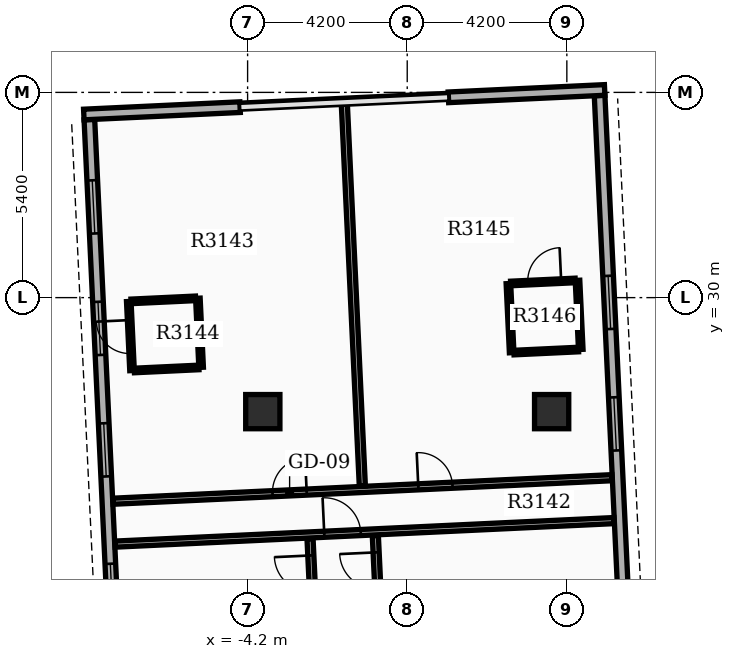
"""IFC4 building model, lengths in metres.
Left out: names, types, materials, properties, quantities, classifications, styles, units other than length and angle.
Written with IfcOpenShell. Run it as: python <this file> out.ifc"""

import sys

from ifc_helpers import new_model, si_unit, direction, frame, frame_2d, origin, origin_2d, place, context, subcontext, project, spatial, rectangle, extrude, element, fill, save


model = new_model("IFC4")
c1 = context("Model", 3, precision=1e-05, world=origin(), true_north=direction((0.0, 1.0)))
c2 = subcontext(c1, "Body", "Model", "MODEL_VIEW")
j1 = project(units=[si_unit("LENGTHUNIT", "METRE"), si_unit("PLANEANGLEUNIT", "RADIAN")], contexts=[c1])
p1 = place(None, origin())
s1 = spatial("IfcSite", under=j1, at=p1, CompositionType="ELEMENT")
p2 = place(p1, origin())
s2 = spatial("IfcBuilding", under=s1, at=p2, CompositionType="ELEMENT")
p3 = place(p2, frame((0.0, 0.0, 196.8)))
s3 = spatial("IfcBuildingStorey", under=s2, at=p3, CompositionType="ELEMENT", Elevation=196.8)
for number, where, z_axis, x_axis in (
    (1, (-3.8, 27.0, 0.0), (0.0, 0.0, 1.0), (1.0, 0.0, 0.0)),
    (2, (3.8, 27.0, 0.0), (0.0, 0.0, 1.0), (1.0, 0.0, 0.0)),
):
    element("IfcColumn", number, at=place(p3, frame(where, z_axis=z_axis, x_axis=x_axis)), inside=s3, PredefinedType="COLUMN", context=c2, shape_type="SweptSolid", body=[
        extrude(rectangle(XDim=0.9, YDim=0.9, at=origin_2d()), origin(), (0.0, 0.0, 1.0), 4.5),
    ])
p4 = place(p3, frame((6.009, 15.24, 0.0), z_axis=(0.0, 0.0, 1.0), x_axis=(-0.047103473814, 0.998890015344, 0.0)))
e3 = element("IfcWall", 3, at=p4, inside=s3, PredefinedType="STANDARD", context=c2, shape_type="SweptSolid", body=[
    extrude(rectangle(XDim=20.1, YDim=0.28, at=frame_2d((10.05, 0.0))), origin(), (0.0, 0.0, 1.0), 3.38),
])
p5 = place(p4, frame((1.6, 0.0, 0.8)))
e4 = element("IfcOpeningElement", 4, at=p5, cuts=e3, PredefinedType="OPENING", context=c2, shape_type="SweptSolid", body=[
    extrude(rectangle(XDim=1.4, YDim=1.6, at=frame_2d((0.7, 0.8))), frame((0.0, 0.15, 0.0), z_axis=(0.0, -1.0, 0.0), x_axis=(1.0, 0.0, 0.0)), (0.0, 0.0, 1.0), 0.3),
])
p6 = place(p4, frame((4.8, 0.0, 0.8)))
e5 = element("IfcOpeningElement", 5, at=p6, cuts=e3, PredefinedType="OPENING", context=c2, shape_type="SweptSolid", body=[
    extrude(rectangle(XDim=1.4, YDim=1.6, at=frame_2d((0.7, 0.8))), frame((0.0, 0.15, 0.0), z_axis=(0.0, -1.0, 0.0), x_axis=(1.0, 0.0, 0.0)), (0.0, 0.0, 1.0), 0.3),
])
p7 = place(p4, frame((10.75, 0.0, 0.8)))
e6 = element("IfcOpeningElement", 6, at=p7, cuts=e3, PredefinedType="OPENING", context=c2, shape_type="SweptSolid", body=[
    extrude(rectangle(XDim=1.4, YDim=1.6, at=frame_2d((0.7, 0.8))), frame((0.0, 0.15, 0.0), z_axis=(0.0, -1.0, 0.0), x_axis=(1.0, 0.0, 0.0)), (0.0, 0.0, 1.0), 0.3),
])
p8 = place(p4, frame((13.95, 0.0, 0.8)))
e7 = element("IfcOpeningElement", 7, at=p8, cuts=e3, PredefinedType="OPENING", context=c2, shape_type="SweptSolid", body=[
    extrude(rectangle(XDim=1.4, YDim=1.6, at=frame_2d((0.7, 0.8))), frame((0.0, 0.15, 0.0), z_axis=(0.0, -1.0, 0.0), x_axis=(1.0, 0.0, 0.0)), (0.0, 0.0, 1.0), 0.3),
])
p9 = place(p3, frame((-8.363, 34.685, 0.0), z_axis=(0.0, 0.0, 1.0), x_axis=(0.047103473814, -0.998890015344, 0.0)))
e8 = element("IfcWall", 8, at=p9, inside=s3, PredefinedType="STANDARD", context=c2, shape_type="SweptSolid", body=[
    extrude(rectangle(XDim=20.1, YDim=0.28, at=frame_2d((10.05, 0.0))), origin(), (0.0, 0.0, 1.0), 3.38),
])
p10 = place(p9, frame((1.6, 0.0, 0.8)))
e9 = element("IfcOpeningElement", 9, at=p10, cuts=e8, PredefinedType="OPENING", context=c2, shape_type="SweptSolid", body=[
    extrude(rectangle(XDim=1.4, YDim=1.6, at=frame_2d((0.7, 0.8))), frame((0.0, 0.15, 0.0), z_axis=(0.0, -1.0, 0.0), x_axis=(1.0, 0.0, 0.0)), (0.0, 0.0, 1.0), 0.3),
])
p11 = place(p9, frame((4.8, 0.0, 0.8)))
e10 = element("IfcOpeningElement", 10, at=p11, cuts=e8, PredefinedType="OPENING", context=c2, shape_type="SweptSolid", body=[
    extrude(rectangle(XDim=1.4, YDim=1.6, at=frame_2d((0.7, 0.8))), frame((0.0, 0.15, 0.0), z_axis=(0.0, -1.0, 0.0), x_axis=(1.0, 0.0, 0.0)), (0.0, 0.0, 1.0), 0.3),
])
p12 = place(p9, frame((8.0, 0.0, 0.8)))
e11 = element("IfcOpeningElement", 11, at=p12, cuts=e8, PredefinedType="OPENING", context=c2, shape_type="SweptSolid", body=[
    extrude(rectangle(XDim=1.4, YDim=1.6, at=frame_2d((0.7, 0.8))), frame((0.0, 0.15, 0.0), z_axis=(0.0, -1.0, 0.0), x_axis=(1.0, 0.0, 0.0)), (0.0, 0.0, 1.0), 0.3),
])
p13 = place(p9, frame((11.7, 0.0, 0.8)))
e12 = element("IfcOpeningElement", 12, at=p13, cuts=e8, PredefinedType="OPENING", context=c2, shape_type="SweptSolid", body=[
    extrude(rectangle(XDim=1.4, YDim=1.6, at=frame_2d((0.7, 0.8))), frame((0.0, 0.15, 0.0), z_axis=(0.0, -1.0, 0.0), x_axis=(1.0, 0.0, 0.0)), (0.0, 0.0, 1.0), 0.3),
])
p14 = place(p9, frame((15.0, 0.0, 0.0)))
e13 = element("IfcOpeningElement", 13, at=p14, cuts=e8, PredefinedType="OPENING", context=c2, shape_type="SweptSolid", body=[
    extrude(rectangle(XDim=0.96, YDim=2.1, at=frame_2d((0.48, 1.05))), frame((0.0, 0.15, 0.0), z_axis=(0.0, -1.0, 0.0), x_axis=(1.0, 0.0, 0.0)), (0.0, 0.0, 1.0), 0.3),
])
p15 = place(p3, frame((5.195, 35.464, 0.0), z_axis=(0.0, 0.0, 1.0), x_axis=(-0.998890436981, -0.047094531617, 0.0)))
e14 = element("IfcWall", 14, at=p15, inside=s3, PredefinedType="STANDARD", context=c2, shape_type="SweptSolid", body=[
    extrude(rectangle(XDim=4.116, YDim=0.28, at=frame_2d((2.058, 0.0))), origin(), (0.0, 0.0, 1.0), 3.38),
])
p16 = place(p3, frame((-4.398, 35.012, 0.0), z_axis=(0.0, 0.0, 1.0), x_axis=(-0.998890305419, -0.047097322001, 0.0)))
e15 = element("IfcWall", 15, at=p16, inside=s3, PredefinedType="STANDARD", context=c2, shape_type="SweptSolid", body=[
    extrude(rectangle(XDim=4.116, YDim=0.28, at=frame_2d((2.058, 0.0))), origin(), (0.0, 0.0, 1.0), 3.38),
])
p17 = place(p3, frame((-0.42, 14.847, 0.0), z_axis=(0.0, 0.0, 1.0), x_axis=(-0.047099864025, 0.99889018556, 0.0)))
e16 = element("IfcWall", 16, at=p17, inside=s3, PredefinedType="PARTITIONING", context=c2, shape_type="SweptSolid", body=[
    extrude(rectangle(XDim=8.9, YDim=0.16, at=frame_2d((4.45, 0.0))), origin(), (0.0, 0.0, 1.0), 3.37),
])
p18 = place(p17, frame((7.5, 0.0, 0.0)))
e17 = element("IfcOpeningElement", 17, at=p18, cuts=e16, PredefinedType="OPENING", context=c2, shape_type="SweptSolid", body=[
    extrude(rectangle(XDim=0.96, YDim=2.15, at=frame_2d((0.48, 1.075))), frame((0.0, 0.09, 0.0), z_axis=(0.0, -1.0, 0.0), x_axis=(1.0, 0.0, 0.0)), (0.0, 0.0, 1.0), 0.18),
])
p19 = place(p3, frame((-2.138, 14.766, 0.0), z_axis=(0.0, 0.0, 1.0), x_axis=(-0.047099864025, 0.99889018556, 0.0)))
e18 = element("IfcWall", 18, at=p19, inside=s3, PredefinedType="PARTITIONING", context=c2, shape_type="SweptSolid", body=[
    extrude(rectangle(XDim=8.9, YDim=0.16, at=frame_2d((4.45, 0.0))), origin(), (0.0, 0.0, 1.0), 3.37),
])
p20 = place(p19, frame((7.5, 0.0, 0.0)))
e19 = element("IfcOpeningElement", 19, at=p20, cuts=e18, PredefinedType="OPENING", context=c2, shape_type="SweptSolid", body=[
    extrude(rectangle(XDim=0.96, YDim=2.15, at=frame_2d((0.48, 1.075))), frame((0.0, 0.09, 0.0), z_axis=(0.0, -1.0, 0.0), x_axis=(1.0, 0.0, 0.0)), (0.0, 0.0, 1.0), 0.18),
])
p21 = place(p3, frame((-7.688, 23.514, 0.0), z_axis=(0.0, 0.0, 1.0), x_axis=(0.998889093558, 0.047123017412, 0.0)))
e20 = element("IfcWall", 20, at=p21, inside=s3, PredefinedType="PARTITIONING", context=c2, shape_type="SweptSolid", body=[
    extrude(rectangle(XDim=13.144, YDim=0.16, at=frame_2d((6.572, 0.0))), origin(), (0.0, 0.0, 1.0), 3.37),
])
p22 = place(p21, frame((5.512, 0.0, 0.0)))
e21 = element("IfcOpeningElement", 21, at=p22, cuts=e20, PredefinedType="OPENING", context=c2, shape_type="SweptSolid", body=[
    extrude(rectangle(XDim=0.96, YDim=2.15, at=frame_2d((0.48, 1.075))), frame((0.0, 0.09, 0.0), z_axis=(0.0, -1.0, 0.0), x_axis=(1.0, 0.0, 0.0)), (0.0, 0.0, 1.0), 0.18),
])
p23 = place(p3, frame((-7.741, 24.643, 0.0), z_axis=(0.0, 0.0, 1.0), x_axis=(0.998889093558, 0.047123017412, 0.0)))
e22 = element("IfcWall", 22, at=p23, inside=s3, PredefinedType="PARTITIONING", context=c2, shape_type="SweptSolid", body=[
    extrude(rectangle(XDim=13.144, YDim=0.16, at=frame_2d((6.572, 0.0))), origin(), (0.0, 0.0, 1.0), 3.37),
])
p24 = place(p23, frame((4.202, 0.0, 0.0)))
e23 = element("IfcOpeningElement", 23, at=p24, cuts=e22, PredefinedType="OPENING", context=c2, shape_type="SweptSolid", body=[
    extrude(rectangle(XDim=0.9, YDim=2.15, at=frame_2d((0.45, 1.075))), frame((0.0, 0.09, 0.0), z_axis=(0.0, -1.0, 0.0), x_axis=(1.0, 0.0, 0.0)), (0.0, 0.0, 1.0), 0.18),
])
p25 = place(p23, frame((8.042, 0.0, 0.0)))
e24 = element("IfcOpeningElement", 24, at=p25, cuts=e22, PredefinedType="OPENING", context=c2, shape_type="SweptSolid", body=[
    extrude(rectangle(XDim=0.9, YDim=2.15, at=frame_2d((0.45, 1.075))), frame((0.0, 0.09, 0.0), z_axis=(0.0, -1.0, 0.0), x_axis=(1.0, 0.0, 0.0)), (0.0, 0.0, 1.0), 0.18),
])
p26 = place(p3, frame((-1.181, 25.042, 0.0), z_axis=(0.0, 0.0, 1.0), x_axis=(-0.047120592333, 0.99888920796, 0.0)))
e25 = element("IfcWall", 25, at=p26, inside=s3, PredefinedType="PARTITIONING", context=c2, shape_type="SweptSolid", body=[
    extrude(rectangle(XDim=10.15, YDim=0.16, at=frame_2d((5.075, 0.0))), origin(), (0.0, 0.0, 1.0), 3.37),
])
p27 = place(p3, frame((-7.241, 28.08, 0.0), z_axis=(0.0, 0.0, 1.0), x_axis=(-0.047080807099, 0.998891083954, 0.0)))
e26 = element("IfcWall", 26, at=p27, inside=s3, PredefinedType="PARTITIONING", context=c2, shape_type="SweptSolid", body=[
    extrude(rectangle(XDim=1.82, YDim=0.12, at=frame_2d((0.91, 0.0))), origin(), (0.0, 0.0, 1.0), 3.37),
])
p28 = place(p27, frame((0.45, 0.0, 0.0)))
e27 = element("IfcOpeningElement", 27, at=p28, cuts=e26, PredefinedType="OPENING", context=c2, shape_type="SweptSolid", body=[
    extrude(rectangle(XDim=0.88, YDim=2.1, at=frame_2d((0.44, 1.05))), frame((0.0, 0.07, 0.0), z_axis=(0.0, -1.0, 0.0), x_axis=(1.0, 0.0, 0.0)), (0.0, 0.0, 1.0), 0.14),
])
p29 = place(p3, frame((-5.423, 28.166, 0.0), z_axis=(0.0, 0.0, 1.0), x_axis=(-0.047080807099, 0.998891083954, 0.0)))
e28 = element("IfcWall", 28, at=p29, inside=s3, PredefinedType="PARTITIONING", context=c2, shape_type="SweptSolid", body=[
    extrude(rectangle(XDim=1.82, YDim=0.12, at=frame_2d((0.91, 0.0))), origin(), (0.0, 0.0, 1.0), 3.37),
])
p30 = place(p3, frame((-7.181, 28.083, 0.0), z_axis=(0.0, 0.0, 1.0), x_axis=(0.998890122477, 0.047101201865, 0.0)))
e29 = element("IfcWall", 29, at=p30, inside=s3, PredefinedType="PARTITIONING", context=c2, shape_type="SweptSolid", body=[
    extrude(rectangle(XDim=1.7, YDim=0.12, at=frame_2d((0.85, 0.0))), origin(), (0.0, 0.0, 1.0), 3.37),
])
p31 = place(p3, frame((-7.267, 29.901, 0.0), z_axis=(0.0, 0.0, 1.0), x_axis=(0.998889803826, 0.047107959116, 0.0)))
e30 = element("IfcWall", 30, at=p31, inside=s3, PredefinedType="PARTITIONING", context=c2, shape_type="SweptSolid", body=[
    extrude(rectangle(XDim=1.7, YDim=0.12, at=frame_2d((0.85, 0.0))), origin(), (0.0, 0.0, 1.0), 3.37),
])
p32 = place(p3, frame((2.748, 28.551, 0.0), z_axis=(0.0, 0.0, 1.0), x_axis=(-0.047080807099, 0.998891083954, 0.0)))
e31 = element("IfcWall", 31, at=p32, inside=s3, PredefinedType="PARTITIONING", context=c2, shape_type="SweptSolid", body=[
    extrude(rectangle(XDim=1.82, YDim=0.12, at=frame_2d((0.91, 0.0))), origin(), (0.0, 0.0, 1.0), 3.37),
])
p33 = place(p3, frame((4.566, 28.637, 0.0), z_axis=(0.0, 0.0, 1.0), x_axis=(-0.047087116047, 0.998890786574, 0.0)))
e32 = element("IfcWall", 32, at=p33, inside=s3, PredefinedType="PARTITIONING", context=c2, shape_type="SweptSolid", body=[
    extrude(rectangle(XDim=1.82, YDim=0.12, at=frame_2d((0.91, 0.0))), origin(), (0.0, 0.0, 1.0), 3.37),
])
p34 = place(p3, frame((2.808, 28.554, 0.0), z_axis=(0.0, 0.0, 1.0), x_axis=(0.998889803826, 0.047107959116, 0.0)))
e33 = element("IfcWall", 33, at=p34, inside=s3, PredefinedType="PARTITIONING", context=c2, shape_type="SweptSolid", body=[
    extrude(rectangle(XDim=1.7, YDim=0.12, at=frame_2d((0.85, 0.0))), origin(), (0.0, 0.0, 1.0), 3.37),
])
p35 = place(p3, frame((2.722, 30.372, 0.0), z_axis=(0.0, 0.0, 1.0), x_axis=(0.998896551812, 0.046964654557, 0.0)))
e34 = element("IfcWall", 34, at=p35, inside=s3, PredefinedType="PARTITIONING", context=c2, shape_type="SweptSolid", body=[
    extrude(rectangle(XDim=1.7, YDim=0.12, at=frame_2d((0.85, 0.0))), origin(), (0.0, 0.0, 1.0), 3.37),
])
p36 = place(p35, frame((0.45, 0.0, 0.0)))
e35 = element("IfcOpeningElement", 35, at=p36, cuts=e34, PredefinedType="OPENING", context=c2, shape_type="SweptSolid", body=[
    extrude(rectangle(XDim=0.88, YDim=2.1, at=frame_2d((0.44, 1.05))), frame((0.0, 0.07, 0.0), z_axis=(0.0, -1.0, 0.0), x_axis=(1.0, 0.0, 0.0)), (0.0, 0.0, 1.0), 0.14),
])
p37 = place(p7, origin())
e36 = element("IfcWindow", 36, at=p37, inside=s3, PartitioningType="SINGLE_PANEL", PredefinedType="WINDOW", context=c2, shape_type="SweptSolid", body=[
    extrude(rectangle(XDim=1.4, YDim=1.6, at=frame_2d((0.7, 0.8))), frame((0.0, 0.03, 0.0), z_axis=(0.0, -1.0, 0.0), x_axis=(1.0, 0.0, 0.0)), (0.0, 0.0, 1.0), 0.06),
])
fill(e6, e36)
p38 = place(p8, origin())
e37 = element("IfcWindow", 37, at=p38, inside=s3, PartitioningType="SINGLE_PANEL", PredefinedType="WINDOW", context=c2, shape_type="SweptSolid", body=[
    extrude(rectangle(XDim=1.4, YDim=1.6, at=frame_2d((0.7, 0.8))), frame((0.0, 0.03, 0.0), z_axis=(0.0, -1.0, 0.0), x_axis=(1.0, 0.0, 0.0)), (0.0, 0.0, 1.0), 0.06),
])
fill(e7, e37)
p39 = place(p10, origin())
e38 = element("IfcWindow", 38, at=p39, inside=s3, PartitioningType="SINGLE_PANEL", PredefinedType="WINDOW", context=c2, shape_type="SweptSolid", body=[
    extrude(rectangle(XDim=1.4, YDim=1.6, at=frame_2d((0.7, 0.8))), frame((0.0, 0.03, 0.0), z_axis=(0.0, -1.0, 0.0), x_axis=(1.0, 0.0, 0.0)), (0.0, 0.0, 1.0), 0.06),
])
fill(e9, e38)
p40 = place(p11, origin())
e39 = element("IfcWindow", 39, at=p40, inside=s3, PartitioningType="SINGLE_PANEL", PredefinedType="WINDOW", context=c2, shape_type="SweptSolid", body=[
    extrude(rectangle(XDim=1.4, YDim=1.6, at=frame_2d((0.7, 0.8))), frame((0.0, 0.03, 0.0), z_axis=(0.0, -1.0, 0.0), x_axis=(1.0, 0.0, 0.0)), (0.0, 0.0, 1.0), 0.06),
])
fill(e10, e39)
p41 = place(p12, origin())
e40 = element("IfcWindow", 40, at=p41, inside=s3, PartitioningType="SINGLE_PANEL", PredefinedType="WINDOW", context=c2, shape_type="SweptSolid", body=[
    extrude(rectangle(XDim=1.4, YDim=1.6, at=frame_2d((0.7, 0.8))), frame((0.0, 0.03, 0.0), z_axis=(0.0, -1.0, 0.0), x_axis=(1.0, 0.0, 0.0)), (0.0, 0.0, 1.0), 0.06),
])
fill(e11, e40)
p42 = place(p13, origin())
e41 = element("IfcWindow", 41, at=p42, inside=s3, PartitioningType="SINGLE_PANEL", PredefinedType="WINDOW", context=c2, shape_type="SweptSolid", body=[
    extrude(rectangle(XDim=1.4, YDim=1.6, at=frame_2d((0.7, 0.8))), frame((0.0, 0.03, 0.0), z_axis=(0.0, -1.0, 0.0), x_axis=(1.0, 0.0, 0.0)), (0.0, 0.0, 1.0), 0.06),
])
fill(e12, e41)
p43 = place(p18, origin())
e42 = element("IfcDoor", 42, at=p43, inside=s3, OperationType="SINGLE_SWING_RIGHT", PredefinedType="DOOR", context=c2, shape_type="SweptSolid", body=[
    extrude(rectangle(XDim=0.96, YDim=2.15, at=frame_2d((0.48, 1.075))), frame((0.0, 0.025, 0.0), z_axis=(0.0, -1.0, 0.0), x_axis=(1.0, 0.0, 0.0)), (0.0, 0.0, 1.0), 0.05),
])
fill(e17, e42)
p44 = place(p20, origin())
e43 = element("IfcDoor", 43, at=p44, inside=s3, OperationType="SINGLE_SWING_RIGHT", PredefinedType="DOOR", context=c2, shape_type="SweptSolid", body=[
    extrude(rectangle(XDim=0.96, YDim=2.15, at=frame_2d((0.48, 1.075))), frame((0.0, 0.025, 0.0), z_axis=(0.0, -1.0, 0.0), x_axis=(1.0, 0.0, 0.0)), (0.0, 0.0, 1.0), 0.05),
])
fill(e19, e43)
p45 = place(p22, origin())
e44 = element("IfcDoor", 44, at=p45, inside=s3, OperationType="SINGLE_SWING_LEFT", PredefinedType="DOOR", context=c2, shape_type="SweptSolid", body=[
    extrude(rectangle(XDim=0.96, YDim=2.15, at=frame_2d((0.48, 1.075))), frame((0.0, 0.025, 0.0), z_axis=(0.0, -1.0, 0.0), x_axis=(1.0, 0.0, 0.0)), (0.0, 0.0, 1.0), 0.05),
])
fill(e21, e44)
p46 = place(p24, origin())
e45 = element("IfcDoor", 45, at=p46, inside=s3, OperationType="SINGLE_SWING_RIGHT", PredefinedType="DOOR", context=c2, shape_type="SweptSolid", body=[
    extrude(rectangle(XDim=0.9, YDim=2.15, at=frame_2d((0.45, 1.075))), frame((0.0, 0.025, 0.0), z_axis=(0.0, -1.0, 0.0), x_axis=(1.0, 0.0, 0.0)), (0.0, 0.0, 1.0), 0.05),
])
fill(e23, e45)
p47 = place(p28, origin())
e46 = element("IfcDoor", 46, at=p47, inside=s3, OperationType="SINGLE_SWING_RIGHT", PredefinedType="DOOR", context=c2, shape_type="SweptSolid", body=[
    extrude(rectangle(XDim=0.88, YDim=2.1, at=frame_2d((0.44, 1.05))), frame((0.0, 0.025, 0.0), z_axis=(0.0, -1.0, 0.0), x_axis=(1.0, 0.0, 0.0)), (0.0, 0.0, 1.0), 0.05),
])
fill(e27, e46)
p48 = place(p25, origin())
e47 = element("IfcDoor", 47, at=p48, inside=s3, OperationType="SINGLE_SWING_LEFT", PredefinedType="DOOR", context=c2, shape_type="SweptSolid", body=[
    extrude(rectangle(XDim=0.9, YDim=2.15, at=frame_2d((0.45, 1.075))), frame((0.0, 0.025, 0.0), z_axis=(0.0, -1.0, 0.0), x_axis=(1.0, 0.0, 0.0)), (0.0, 0.0, 1.0), 0.05),
])
fill(e24, e47)
p49 = place(p36, origin())
e48 = element("IfcDoor", 48, at=p49, inside=s3, OperationType="SINGLE_SWING_RIGHT", PredefinedType="DOOR", context=c2, shape_type="SweptSolid", body=[
    extrude(rectangle(XDim=0.88, YDim=2.1, at=frame_2d((0.44, 1.05))), frame((0.0, 0.025, 0.0), z_axis=(0.0, -1.0, 0.0), x_axis=(1.0, 0.0, 0.0)), (0.0, 0.0, 1.0), 0.05),
])
fill(e35, e48)
save(model, sys.argv[1])
